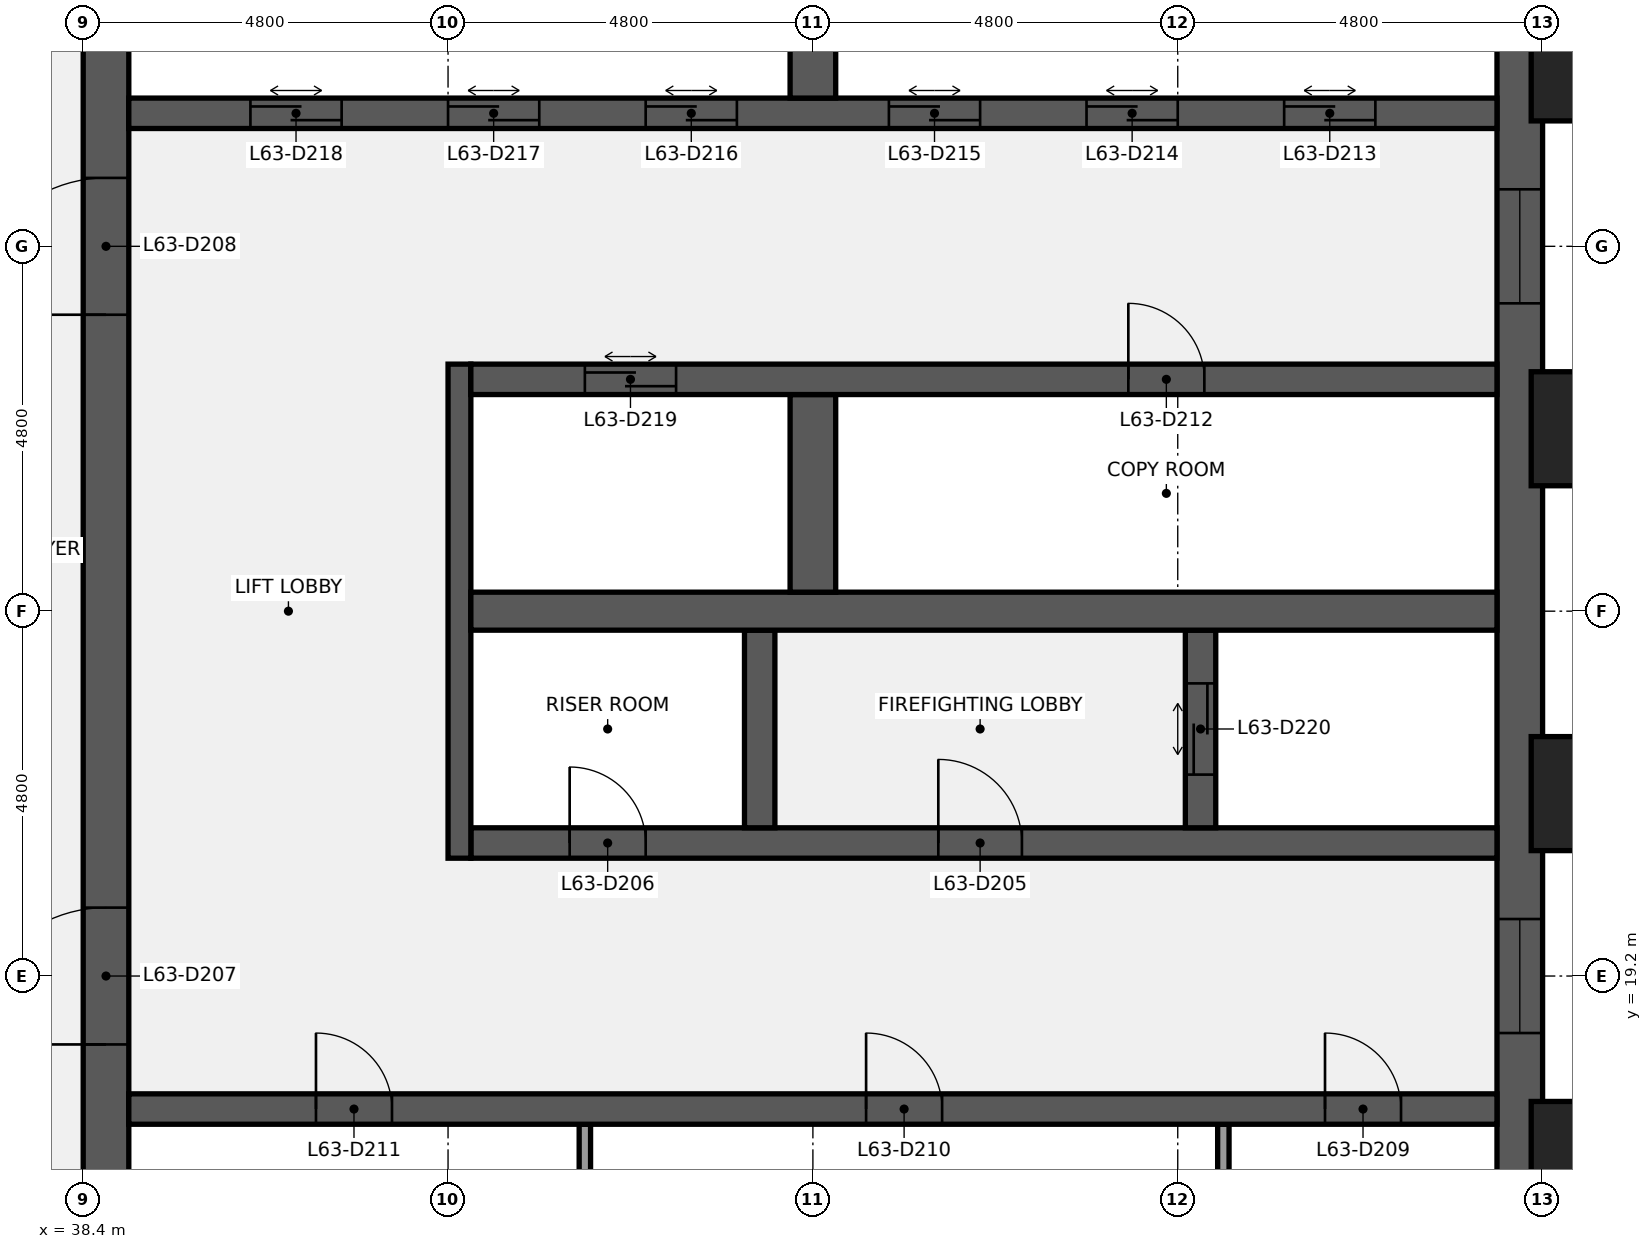
"""IFC4 building model, lengths in metres.
Left out: names, types, materials, properties, quantities, classifications, styles, units other than length and angle.
Written with IfcOpenShell. Run it as: python <this file> out.ifc"""

import sys

from ifc_helpers import new_model, si_unit, direction, frame, frame_2d, origin, origin_2d, place, context, subcontext, project, spatial, rectangle, extrude, element, fill, save


model = new_model("IFC4")
c1 = context("Model", 3, precision=1e-05, world=origin(), true_north=direction((0.0, 1.0)))
c2 = subcontext(c1, "Body", "Model", "MODEL_VIEW")
j1 = project(units=[si_unit("LENGTHUNIT", "METRE"), si_unit("PLANEANGLEUNIT", "RADIAN")], contexts=[c1])
p1 = place(None, origin())
s1 = spatial("IfcSite", under=j1, at=p1, CompositionType="ELEMENT")
p2 = place(p1, origin())
s2 = spatial("IfcBuilding", under=s1, at=p2, CompositionType="ELEMENT")
p3 = place(p2, frame((0.0, 0.0, 290.3)))
s3 = spatial("IfcBuildingStorey", under=s2, at=p3, CompositionType="ELEMENT", Elevation=290.3)
p4 = place(p3, frame((57.3, 38.4, 0.0), z_axis=(0.0, 0.0, 1.0), x_axis=(0.0, -1.0, 0.0)))
e1 = element("IfcWall", 1, at=p4, inside=s3, PredefinedType="SHEAR", context=c2, shape_type="SweptSolid", body=[
    extrude(rectangle(XDim=28.8, YDim=0.6, at=frame_2d((14.4, 0.0))), origin(), (0.0, 0.0, 1.0), 3.84),
])
p5 = place(p4, frame((18.45, 0.0, 0.9)))
e2 = element("IfcOpeningElement", 2, at=p5, cuts=e1, PredefinedType="OPENING", context=c2, shape_type="SweptSolid", body=[
    extrude(rectangle(XDim=1.5, YDim=1.5, at=frame_2d((0.75, 0.75))), frame((0.0, 0.31, 0.0), z_axis=(0.0, -1.0, 0.0), x_axis=(1.0, 0.0, 0.0)), (0.0, 0.0, 1.0), 0.62),
])
p6 = place(p4, frame((8.85, 0.0, 0.9)))
e3 = element("IfcOpeningElement", 3, at=p6, cuts=e1, PredefinedType="OPENING", context=c2, shape_type="SweptSolid", body=[
    extrude(rectangle(XDim=1.5, YDim=1.5, at=frame_2d((0.75, 0.75))), frame((0.0, 0.31, 0.0), z_axis=(0.0, -1.0, 0.0), x_axis=(1.0, 0.0, 0.0)), (0.0, 0.0, 1.0), 0.62),
])
p7 = place(p3, frame((38.7, 9.6, 0.0), z_axis=(0.0, 0.0, 1.0), x_axis=(0.0, 1.0, 0.0)))
e4 = element("IfcWall", 4, at=p7, inside=s3, PredefinedType="SHEAR", context=c2, shape_type="SweptSolid", body=[
    extrude(rectangle(XDim=28.8, YDim=0.6, at=frame_2d((14.4, 0.0))), origin(), (0.0, 0.0, 1.0), 3.84),
])
p8 = place(p7, frame((8.7, 0.0, 0.0)))
e5 = element("IfcOpeningElement", 5, at=p8, cuts=e4, PredefinedType="OPENING", context=c2, shape_type="SweptSolid", body=[
    extrude(rectangle(XDim=1.8, YDim=2.1, at=frame_2d((0.9, 1.05))), frame((0.0, 0.31, 0.0), z_axis=(0.0, -1.0, 0.0), x_axis=(1.0, 0.0, 0.0)), (0.0, 0.0, 1.0), 0.62),
])
p9 = place(p7, frame((18.3, 0.0, 0.0)))
e6 = element("IfcOpeningElement", 6, at=p9, cuts=e4, PredefinedType="OPENING", context=c2, shape_type="SweptSolid", body=[
    extrude(rectangle(XDim=1.8, YDim=2.1, at=frame_2d((0.9, 1.05))), frame((0.0, 0.31, 0.0), z_axis=(0.0, -1.0, 0.0), x_axis=(1.0, 0.0, 0.0)), (0.0, 0.0, 1.0), 0.62),
])
for number, where, z_axis, x_axis in (
    (7, (53.4, 14.65, 0.0), (0.0, 0.0, 1.0), (0.0, 1.0, 0.0)),
    (8, (45.0, 14.65, 0.0), (0.0, 0.0, 1.0), (0.0, 1.0, 0.0)),
):
    element("IfcWall", number, at=place(p3, frame(where, z_axis=z_axis, x_axis=x_axis)), inside=s3, PredefinedType="PARTITIONING", context=c2, shape_type="SweptSolid", body=[
        extrude(rectangle(XDim=2.6, YDim=0.15, at=frame_2d((1.3, 0.0))), origin(), (0.0, 0.0, 1.0), 3.84),
    ])
p10 = place(p3, frame((39.0, 17.45, 0.0), z_axis=(0.0, 0.0, 1.0), x_axis=(1.0, 0.0, 0.0)))
e9 = element("IfcWall", 9, at=p10, inside=s3, PredefinedType="SHEAR", context=c2, shape_type="SweptSolid", body=[
    extrude(rectangle(XDim=18.0, YDim=0.4, at=frame_2d((9.0, 0.0))), origin(), (0.0, 0.0, 1.0), 3.84),
])
p11 = place(p10, frame((15.738, 0.0, 0.0)))
e10 = element("IfcOpeningElement", 10, at=p11, cuts=e9, PredefinedType="OPENING", context=c2, shape_type="SweptSolid", body=[
    extrude(rectangle(XDim=1.0, YDim=2.1, at=frame_2d((0.5, 1.05))), frame((0.0, 0.21, 0.0), z_axis=(0.0, -1.0, 0.0), x_axis=(1.0, 0.0, 0.0)), (0.0, 0.0, 1.0), 0.42),
])
p12 = place(p10, frame((9.7, 0.0, 0.0)))
e11 = element("IfcOpeningElement", 11, at=p12, cuts=e9, PredefinedType="OPENING", context=c2, shape_type="SweptSolid", body=[
    extrude(rectangle(XDim=1.0, YDim=2.1, at=frame_2d((0.5, 1.05))), frame((0.0, 0.21, 0.0), z_axis=(0.0, -1.0, 0.0), x_axis=(1.0, 0.0, 0.0)), (0.0, 0.0, 1.0), 0.42),
])
p13 = place(p10, frame((2.462, 0.0, 0.0)))
e12 = element("IfcOpeningElement", 12, at=p13, cuts=e9, PredefinedType="OPENING", context=c2, shape_type="SweptSolid", body=[
    extrude(rectangle(XDim=1.0, YDim=2.1, at=frame_2d((0.5, 1.05))), frame((0.0, 0.21, 0.0), z_axis=(0.0, -1.0, 0.0), x_axis=(1.0, 0.0, 0.0)), (0.0, 0.0, 1.0), 0.42),
])
p14 = place(p3, frame((43.5, 20.95, 0.0), z_axis=(0.0, 0.0, 1.0), x_axis=(1.0, 0.0, 0.0)))
e13 = element("IfcWall", 13, at=p14, inside=s3, PredefinedType="SHEAR", context=c2, shape_type="SweptSolid", body=[
    extrude(rectangle(XDim=13.5, YDim=0.4, at=frame_2d((6.75, 0.0))), origin(), (0.0, 0.0, 1.0), 3.84),
])
p15 = place(p14, frame((6.15, 0.0, 0.0)))
e14 = element("IfcOpeningElement", 14, at=p15, cuts=e13, PredefinedType="OPENING", context=c2, shape_type="SweptSolid", body=[
    extrude(rectangle(XDim=1.1, YDim=2.1, at=frame_2d((0.55, 1.05))), frame((0.0, 0.21, 0.0), z_axis=(0.0, -1.0, 0.0), x_axis=(1.0, 0.0, 0.0)), (0.0, 0.0, 1.0), 0.42),
])
p16 = place(p14, frame((1.3, 0.0, 0.0)))
e15 = element("IfcOpeningElement", 15, at=p16, cuts=e13, PredefinedType="OPENING", context=c2, shape_type="SweptSolid", body=[
    extrude(rectangle(XDim=1.0, YDim=2.1, at=frame_2d((0.5, 1.05))), frame((0.0, 0.21, 0.0), z_axis=(0.0, -1.0, 0.0), x_axis=(1.0, 0.0, 0.0)), (0.0, 0.0, 1.0), 0.42),
])
p17 = place(p3, frame((43.35, 20.75, 0.0), z_axis=(0.0, 0.0, 1.0), x_axis=(0.0, 1.0, 0.0)))
e16 = element("IfcWall", 16, at=p17, inside=s3, PredefinedType="SHEAR", context=c2, shape_type="SweptSolid", body=[
    extrude(rectangle(XDim=6.5, YDim=0.3, at=frame_2d((3.25, 0.0))), origin(), (0.0, 0.0, 1.0), 3.84),
])
p18 = place(p3, frame((53.1, 21.15, 0.0), z_axis=(0.0, 0.0, 1.0), x_axis=(0.0, 1.0, 0.0)))
e17 = element("IfcWall", 17, at=p18, inside=s3, PredefinedType="SHEAR", context=c2, shape_type="SweptSolid", body=[
    extrude(rectangle(XDim=2.6, YDim=0.4, at=frame_2d((1.3, 0.0))), origin(), (0.0, 0.0, 1.0), 3.84),
])
p19 = place(p18, frame((0.7, 0.0, 0.0)))
e18 = element("IfcOpeningElement", 18, at=p19, cuts=e17, PredefinedType="OPENING", context=c2, shape_type="SweptSolid", body=[
    extrude(rectangle(XDim=1.2, YDim=2.1, at=frame_2d((0.6, 1.05))), frame((0.0, 0.21, 0.0), z_axis=(0.0, -1.0, 0.0), x_axis=(1.0, 0.0, 0.0)), (0.0, 0.0, 1.0), 0.42),
])
p20 = place(p3, frame((47.3, 21.15, 0.0), z_axis=(0.0, 0.0, 1.0), x_axis=(0.0, 1.0, 0.0)))
e19 = element("IfcWall", 19, at=p20, inside=s3, PredefinedType="SHEAR", context=c2, shape_type="SweptSolid", body=[
    extrude(rectangle(XDim=2.6, YDim=0.4, at=frame_2d((1.3, 0.0))), origin(), (0.0, 0.0, 1.0), 3.84),
])
p21 = place(p3, frame((43.5, 24.0, 0.0), z_axis=(0.0, 0.0, 1.0), x_axis=(1.0, 0.0, 0.0)))
e20 = element("IfcWall", 20, at=p21, inside=s3, PredefinedType="SHEAR", context=c2, shape_type="SweptSolid", body=[
    extrude(rectangle(XDim=13.5, YDim=0.5, at=frame_2d((6.75, 0.0))), origin(), (0.0, 0.0, 1.0), 3.84),
])
p22 = place(p3, frame((48.0, 24.25, 0.0), z_axis=(0.0, 0.0, 1.0), x_axis=(0.0, 1.0, 0.0)))
e21 = element("IfcWall", 21, at=p22, inside=s3, PredefinedType="SHEAR", context=c2, shape_type="SweptSolid", body=[
    extrude(rectangle(XDim=2.6, YDim=0.6, at=frame_2d((1.3, 0.0))), origin(), (0.0, 0.0, 1.0), 3.84),
])
p23 = place(p3, frame((43.5, 27.05, 0.0), z_axis=(0.0, 0.0, 1.0), x_axis=(1.0, 0.0, 0.0)))
e22 = element("IfcWall", 22, at=p23, inside=s3, PredefinedType="SHEAR", context=c2, shape_type="SweptSolid", body=[
    extrude(rectangle(XDim=13.5, YDim=0.4, at=frame_2d((6.75, 0.0))), origin(), (0.0, 0.0, 1.0), 3.84),
])
p24 = place(p23, frame((8.65, 0.0, 0.0)))
e23 = element("IfcOpeningElement", 23, at=p24, cuts=e22, PredefinedType="OPENING", context=c2, shape_type="SweptSolid", body=[
    extrude(rectangle(XDim=1.0, YDim=2.1, at=frame_2d((0.5, 1.05))), frame((0.0, 0.21, 0.0), z_axis=(0.0, -1.0, 0.0), x_axis=(1.0, 0.0, 0.0)), (0.0, 0.0, 1.0), 0.42),
])
p25 = place(p23, frame((1.5, 0.0, 0.0)))
e24 = element("IfcOpeningElement", 24, at=p25, cuts=e22, PredefinedType="OPENING", context=c2, shape_type="SweptSolid", body=[
    extrude(rectangle(XDim=1.2, YDim=2.1, at=frame_2d((0.6, 1.05))), frame((0.0, 0.21, 0.0), z_axis=(0.0, -1.0, 0.0), x_axis=(1.0, 0.0, 0.0)), (0.0, 0.0, 1.0), 0.42),
])
p26 = place(p3, frame((39.0, 30.55, 0.0), z_axis=(0.0, 0.0, 1.0), x_axis=(1.0, 0.0, 0.0)))
e25 = element("IfcWall", 25, at=p26, inside=s3, PredefinedType="SHEAR", context=c2, shape_type="SweptSolid", body=[
    extrude(rectangle(XDim=18.0, YDim=0.4, at=frame_2d((9.0, 0.0))), origin(), (0.0, 0.0, 1.0), 3.84),
])
p27 = place(p26, frame((15.2, 0.0, 0.0)))
e26 = element("IfcOpeningElement", 26, at=p27, cuts=e25, PredefinedType="OPENING", context=c2, shape_type="SweptSolid", body=[
    extrude(rectangle(XDim=1.2, YDim=2.1, at=frame_2d((0.6, 1.05))), frame((0.0, 0.21, 0.0), z_axis=(0.0, -1.0, 0.0), x_axis=(1.0, 0.0, 0.0)), (0.0, 0.0, 1.0), 0.42),
])
p28 = place(p26, frame((12.6, 0.0, 0.0)))
e27 = element("IfcOpeningElement", 27, at=p28, cuts=e25, PredefinedType="OPENING", context=c2, shape_type="SweptSolid", body=[
    extrude(rectangle(XDim=1.2, YDim=2.1, at=frame_2d((0.6, 1.05))), frame((0.0, 0.21, 0.0), z_axis=(0.0, -1.0, 0.0), x_axis=(1.0, 0.0, 0.0)), (0.0, 0.0, 1.0), 0.42),
])
p29 = place(p26, frame((10.0, 0.0, 0.0)))
e28 = element("IfcOpeningElement", 28, at=p29, cuts=e25, PredefinedType="OPENING", context=c2, shape_type="SweptSolid", body=[
    extrude(rectangle(XDim=1.2, YDim=2.1, at=frame_2d((0.6, 1.05))), frame((0.0, 0.21, 0.0), z_axis=(0.0, -1.0, 0.0), x_axis=(1.0, 0.0, 0.0)), (0.0, 0.0, 1.0), 0.42),
])
p30 = place(p26, frame((6.8, 0.0, 0.0)))
e29 = element("IfcOpeningElement", 29, at=p30, cuts=e25, PredefinedType="OPENING", context=c2, shape_type="SweptSolid", body=[
    extrude(rectangle(XDim=1.2, YDim=2.1, at=frame_2d((0.6, 1.05))), frame((0.0, 0.21, 0.0), z_axis=(0.0, -1.0, 0.0), x_axis=(1.0, 0.0, 0.0)), (0.0, 0.0, 1.0), 0.42),
])
p31 = place(p26, frame((4.2, 0.0, 0.0)))
e30 = element("IfcOpeningElement", 30, at=p31, cuts=e25, PredefinedType="OPENING", context=c2, shape_type="SweptSolid", body=[
    extrude(rectangle(XDim=1.2, YDim=2.1, at=frame_2d((0.6, 1.05))), frame((0.0, 0.21, 0.0), z_axis=(0.0, -1.0, 0.0), x_axis=(1.0, 0.0, 0.0)), (0.0, 0.0, 1.0), 0.42),
])
p32 = place(p26, frame((1.6, 0.0, 0.0)))
e31 = element("IfcOpeningElement", 31, at=p32, cuts=e25, PredefinedType="OPENING", context=c2, shape_type="SweptSolid", body=[
    extrude(rectangle(XDim=1.2, YDim=2.1, at=frame_2d((0.6, 1.05))), frame((0.0, 0.21, 0.0), z_axis=(0.0, -1.0, 0.0), x_axis=(1.0, 0.0, 0.0)), (0.0, 0.0, 1.0), 0.42),
])
p33 = place(p3, frame((48.0, 30.75, 0.0), z_axis=(0.0, 0.0, 1.0), x_axis=(0.0, 1.0, 0.0)))
e32 = element("IfcWall", 32, at=p33, inside=s3, PredefinedType="SHEAR", context=c2, shape_type="SweptSolid", body=[
    extrude(rectangle(XDim=2.6, YDim=0.6, at=frame_2d((1.3, 0.0))), origin(), (0.0, 0.0, 1.0), 3.84),
])
for number, where, z_axis, x_axis in (
    (33, (58.35, 16.8, 0.0), (0.0, 0.0, 1.0), (0.0, 1.0, 0.0)),
    (34, (58.35, 21.6, 0.0), (0.0, 0.0, 1.0), (0.0, 1.0, 0.0)),
    (35, (58.35, 26.4, 0.0), (0.0, 0.0, 1.0), (0.0, 1.0, 0.0)),
    (36, (58.35, 31.2, 0.0), (0.0, 0.0, 1.0), (0.0, 1.0, 0.0)),
):
    element("IfcColumn", number, at=place(p3, frame(where, z_axis=z_axis, x_axis=x_axis)), inside=s3, PredefinedType="PILASTER", context=c2, shape_type="SweptSolid", body=[
        extrude(rectangle(XDim=1.8, YDim=1.5, at=origin_2d()), origin(), (0.0, 0.0, 1.0), 4.0),
    ])
p34 = place(p15, origin())
e37 = element("IfcDoor", 37, at=p34, inside=s3, OperationType="SINGLE_SWING_LEFT", PredefinedType="DOOR", context=c2, shape_type="SweptSolid", body=[
    extrude(rectangle(XDim=1.1, YDim=2.1, at=frame_2d((0.55, 1.05))), frame((0.0, 0.025, 0.0), z_axis=(0.0, -1.0, 0.0), x_axis=(1.0, 0.0, 0.0)), (0.0, 0.0, 1.0), 0.05),
])
fill(e14, e37)
p35 = place(p16, origin())
e38 = element("IfcDoor", 38, at=p35, inside=s3, OperationType="SINGLE_SWING_LEFT", PredefinedType="DOOR", context=c2, shape_type="SweptSolid", body=[
    extrude(rectangle(XDim=1.0, YDim=2.1, at=frame_2d((0.5, 1.05))), frame((0.0, 0.025, 0.0), z_axis=(0.0, -1.0, 0.0), x_axis=(1.0, 0.0, 0.0)), (0.0, 0.0, 1.0), 0.05),
])
fill(e15, e38)
p36 = place(p8, origin())
e39 = element("IfcDoor", 39, at=p36, inside=s3, OperationType="DOUBLE_DOOR_SINGLE_SWING", PredefinedType="DOOR", context=c2, shape_type="SweptSolid", body=[
    extrude(rectangle(XDim=1.8, YDim=2.1, at=frame_2d((0.9, 1.05))), frame((0.0, 0.025, 0.0), z_axis=(0.0, -1.0, 0.0), x_axis=(1.0, 0.0, 0.0)), (0.0, 0.0, 1.0), 0.05),
])
fill(e5, e39)
p37 = place(p9, origin())
e40 = element("IfcDoor", 40, at=p37, inside=s3, OperationType="DOUBLE_DOOR_SINGLE_SWING", PredefinedType="DOOR", context=c2, shape_type="SweptSolid", body=[
    extrude(rectangle(XDim=1.8, YDim=2.1, at=frame_2d((0.9, 1.05))), frame((0.0, 0.025, 0.0), z_axis=(0.0, -1.0, 0.0), x_axis=(1.0, 0.0, 0.0)), (0.0, 0.0, 1.0), 0.05),
])
fill(e6, e40)
p38 = place(p11, origin())
e41 = element("IfcDoor", 41, at=p38, inside=s3, OperationType="SINGLE_SWING_LEFT", PredefinedType="DOOR", context=c2, shape_type="SweptSolid", body=[
    extrude(rectangle(XDim=1.0, YDim=2.1, at=frame_2d((0.5, 1.05))), frame((0.0, 0.025, 0.0), z_axis=(0.0, -1.0, 0.0), x_axis=(1.0, 0.0, 0.0)), (0.0, 0.0, 1.0), 0.05),
])
fill(e10, e41)
p39 = place(p12, origin())
e42 = element("IfcDoor", 42, at=p39, inside=s3, OperationType="SINGLE_SWING_LEFT", PredefinedType="DOOR", context=c2, shape_type="SweptSolid", body=[
    extrude(rectangle(XDim=1.0, YDim=2.1, at=frame_2d((0.5, 1.05))), frame((0.0, 0.025, 0.0), z_axis=(0.0, -1.0, 0.0), x_axis=(1.0, 0.0, 0.0)), (0.0, 0.0, 1.0), 0.05),
])
fill(e11, e42)
p40 = place(p13, origin())
e43 = element("IfcDoor", 43, at=p40, inside=s3, OperationType="SINGLE_SWING_LEFT", PredefinedType="DOOR", context=c2, shape_type="SweptSolid", body=[
    extrude(rectangle(XDim=1.0, YDim=2.1, at=frame_2d((0.5, 1.05))), frame((0.0, 0.025, 0.0), z_axis=(0.0, -1.0, 0.0), x_axis=(1.0, 0.0, 0.0)), (0.0, 0.0, 1.0), 0.05),
])
fill(e12, e43)
p41 = place(p24, origin())
e44 = element("IfcDoor", 44, at=p41, inside=s3, OperationType="SINGLE_SWING_LEFT", PredefinedType="DOOR", context=c2, shape_type="SweptSolid", body=[
    extrude(rectangle(XDim=1.0, YDim=2.1, at=frame_2d((0.5, 1.05))), frame((0.0, 0.025, 0.0), z_axis=(0.0, -1.0, 0.0), x_axis=(1.0, 0.0, 0.0)), (0.0, 0.0, 1.0), 0.05),
])
fill(e23, e44)
p42 = place(p27, origin())
e45 = element("IfcDoor", 45, at=p42, inside=s3, OperationType="DOUBLE_DOOR_SLIDING", PredefinedType="DOOR", context=c2, shape_type="SweptSolid", body=[
    extrude(rectangle(XDim=1.2, YDim=2.1, at=frame_2d((0.6, 1.05))), frame((0.0, 0.025, 0.0), z_axis=(0.0, -1.0, 0.0), x_axis=(1.0, 0.0, 0.0)), (0.0, 0.0, 1.0), 0.05),
])
fill(e26, e45)
p43 = place(p28, origin())
e46 = element("IfcDoor", 46, at=p43, inside=s3, OperationType="DOUBLE_DOOR_SLIDING", PredefinedType="DOOR", context=c2, shape_type="SweptSolid", body=[
    extrude(rectangle(XDim=1.2, YDim=2.1, at=frame_2d((0.6, 1.05))), frame((0.0, 0.025, 0.0), z_axis=(0.0, -1.0, 0.0), x_axis=(1.0, 0.0, 0.0)), (0.0, 0.0, 1.0), 0.05),
])
fill(e27, e46)
p44 = place(p29, origin())
e47 = element("IfcDoor", 47, at=p44, inside=s3, OperationType="DOUBLE_DOOR_SLIDING", PredefinedType="DOOR", context=c2, shape_type="SweptSolid", body=[
    extrude(rectangle(XDim=1.2, YDim=2.1, at=frame_2d((0.6, 1.05))), frame((0.0, 0.025, 0.0), z_axis=(0.0, -1.0, 0.0), x_axis=(1.0, 0.0, 0.0)), (0.0, 0.0, 1.0), 0.05),
])
fill(e28, e47)
p45 = place(p30, origin())
e48 = element("IfcDoor", 48, at=p45, inside=s3, OperationType="DOUBLE_DOOR_SLIDING", PredefinedType="DOOR", context=c2, shape_type="SweptSolid", body=[
    extrude(rectangle(XDim=1.2, YDim=2.1, at=frame_2d((0.6, 1.05))), frame((0.0, 0.025, 0.0), z_axis=(0.0, -1.0, 0.0), x_axis=(1.0, 0.0, 0.0)), (0.0, 0.0, 1.0), 0.05),
])
fill(e29, e48)
p46 = place(p31, origin())
e49 = element("IfcDoor", 49, at=p46, inside=s3, OperationType="DOUBLE_DOOR_SLIDING", PredefinedType="DOOR", context=c2, shape_type="SweptSolid", body=[
    extrude(rectangle(XDim=1.2, YDim=2.1, at=frame_2d((0.6, 1.05))), frame((0.0, 0.025, 0.0), z_axis=(0.0, -1.0, 0.0), x_axis=(1.0, 0.0, 0.0)), (0.0, 0.0, 1.0), 0.05),
])
fill(e30, e49)
p47 = place(p32, origin())
e50 = element("IfcDoor", 50, at=p47, inside=s3, OperationType="DOUBLE_DOOR_SLIDING", PredefinedType="DOOR", context=c2, shape_type="SweptSolid", body=[
    extrude(rectangle(XDim=1.2, YDim=2.1, at=frame_2d((0.6, 1.05))), frame((0.0, 0.025, 0.0), z_axis=(0.0, -1.0, 0.0), x_axis=(1.0, 0.0, 0.0)), (0.0, 0.0, 1.0), 0.05),
])
fill(e31, e50)
p48 = place(p25, origin())
e51 = element("IfcDoor", 51, at=p48, inside=s3, OperationType="DOUBLE_DOOR_SLIDING", PredefinedType="DOOR", context=c2, shape_type="SweptSolid", body=[
    extrude(rectangle(XDim=1.2, YDim=2.1, at=frame_2d((0.6, 1.05))), frame((0.0, 0.025, 0.0), z_axis=(0.0, -1.0, 0.0), x_axis=(1.0, 0.0, 0.0)), (0.0, 0.0, 1.0), 0.05),
])
fill(e24, e51)
p49 = place(p19, origin())
e52 = element("IfcDoor", 52, at=p49, inside=s3, OperationType="DOUBLE_DOOR_SLIDING", PredefinedType="DOOR", context=c2, shape_type="SweptSolid", body=[
    extrude(rectangle(XDim=1.2, YDim=2.1, at=frame_2d((0.6, 1.05))), frame((0.0, 0.025, 0.0), z_axis=(0.0, -1.0, 0.0), x_axis=(1.0, 0.0, 0.0)), (0.0, 0.0, 1.0), 0.05),
])
fill(e18, e52)
p50 = place(p5, origin())
e53 = element("IfcWindow", 53, at=p50, inside=s3, PartitioningType="SINGLE_PANEL", PredefinedType="WINDOW", context=c2, shape_type="SweptSolid", body=[
    extrude(rectangle(XDim=1.5, YDim=1.5, at=frame_2d((0.75, 0.75))), frame((0.0, 0.03, 0.0), z_axis=(0.0, -1.0, 0.0), x_axis=(1.0, 0.0, 0.0)), (0.0, 0.0, 1.0), 0.06),
])
fill(e2, e53)
p51 = place(p6, origin())
e54 = element("IfcWindow", 54, at=p51, inside=s3, PartitioningType="SINGLE_PANEL", PredefinedType="WINDOW", context=c2, shape_type="SweptSolid", body=[
    extrude(rectangle(XDim=1.5, YDim=1.5, at=frame_2d((0.75, 0.75))), frame((0.0, 0.03, 0.0), z_axis=(0.0, -1.0, 0.0), x_axis=(1.0, 0.0, 0.0)), (0.0, 0.0, 1.0), 0.06),
])
fill(e3, e54)
save(model, sys.argv[1])
